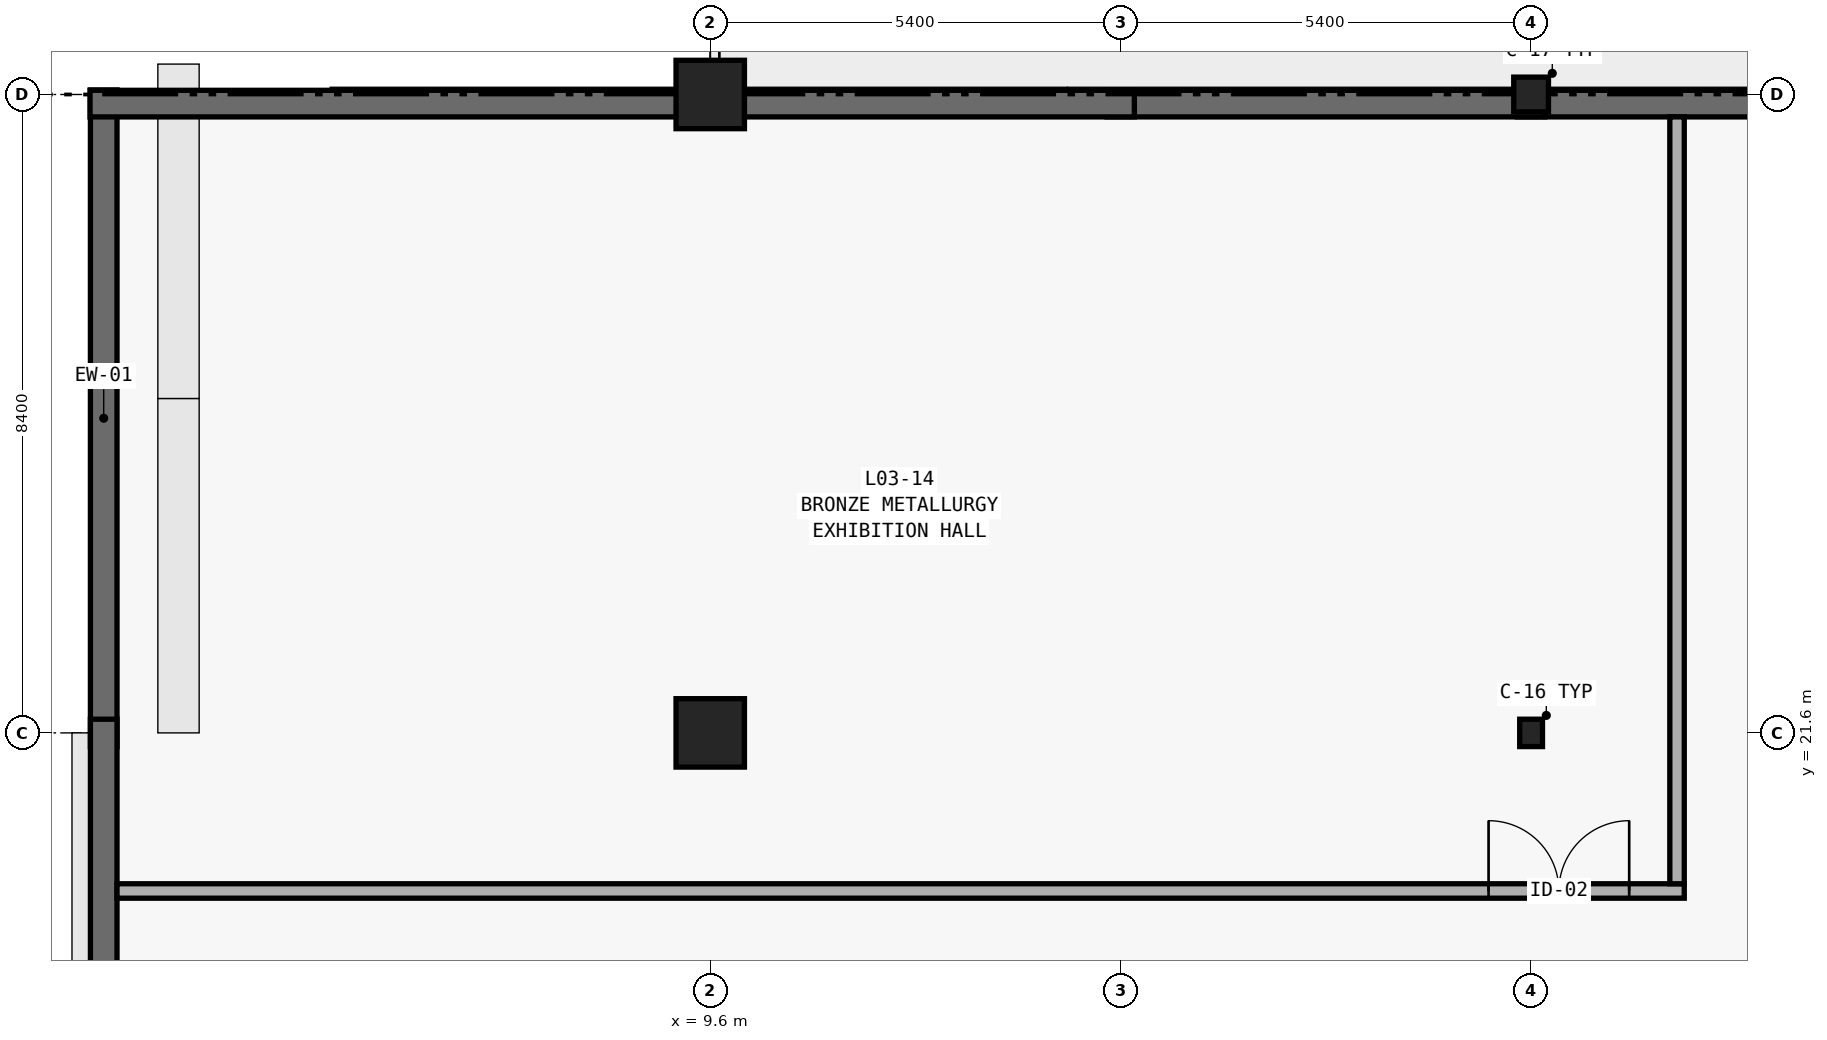
"""IFC4 building model, lengths in metres.
Left out: names, types, materials, properties, quantities, classifications, styles, units other than length and angle.
Written with IfcOpenShell. Run it as: python <this file> out.ifc"""

import sys

from ifc_helpers import new_model, si_unit, direction, frame, frame_2d, origin, origin_2d, place, context, subcontext, project, spatial, rectangle, hollow_circle, i_section, extrude, element, fill, save


model = new_model("IFC4")
c1 = context("Model", 3, precision=1e-05, world=origin(), true_north=direction((0.0, 1.0)))
c2 = subcontext(c1, "Body", "Model", "MODEL_VIEW")
j1 = project(units=[si_unit("LENGTHUNIT", "METRE"), si_unit("PLANEANGLEUNIT", "RADIAN")], contexts=[c1])
p1 = place(None, origin())
s1 = spatial("IfcSite", under=j1, at=p1, CompositionType="ELEMENT")
p2 = place(p1, origin())
s2 = spatial("IfcBuilding", under=s1, at=p2, CompositionType="ELEMENT")
p3 = place(p2, frame((0.0, 0.0, 17.1)))
s3 = spatial("IfcBuildingStorey", under=s2, at=p3, CompositionType="ELEMENT", Elevation=17.1)
for number, where, z_axis, x_axis in (
    (1, (9.6, 21.6, 0.0), (0.0, 0.0, 1.0), (1.0, 0.0, 0.0)),
    (2, (9.6, 30.0, 0.0), (0.0, 0.0, 1.0), (1.0, 0.0, 0.0)),
):
    element("IfcColumn", number, at=place(p3, frame(where, z_axis=z_axis, x_axis=x_axis)), inside=s3, PredefinedType="COLUMN", context=c2, shape_type="SweptSolid", body=[
        extrude(rectangle(XDim=0.9, YDim=0.9, at=origin_2d()), origin(), (0.0, 0.0, 1.0), 4.2),
    ])
p4 = place(p3, frame((20.4, 21.6, 0.0), z_axis=(0.0, 0.0, 1.0), x_axis=(1.0, 0.0, 0.0)))
e3 = element("IfcColumn", 3, at=p4, inside=s3, PredefinedType="COLUMN", context=c2, shape_type="SweptSolid", body=[
    extrude(i_section(OverallWidth=0.3, OverallDepth=0.36, WebThickness=0.012, FlangeThickness=0.022, FilletRadius=0.027, at=origin_2d()), origin(), (0.0, 0.0, 1.0), 4.2),
])
p5 = place(p3, frame((20.4, 30.0, 0.0), z_axis=(0.0, 0.0, 1.0), x_axis=(1.0, 0.0, 0.0)))
e4 = element("IfcColumn", 4, at=p5, inside=s3, PredefinedType="COLUMN", context=c2, shape_type="SweptSolid", body=[
    extrude(hollow_circle(Radius=0.229, WallThickness=0.02, at=origin_2d()), origin(), (0.0, 0.0, 1.0), 4.2),
])
p6 = place(p3, frame((1.62, 30.06, 0.0), z_axis=(0.0, 0.0, 1.0), x_axis=(0.0, -1.0, 0.0)))
e5 = element("IfcWall", 5, at=p6, inside=s3, PredefinedType="STANDARD", context=c2, shape_type="SweptSolid", body=[
    extrude(rectangle(XDim=8.64, YDim=0.35, at=frame_2d((4.32, 0.0))), origin(), (0.0, 0.0, 1.0), 3.9),
])
p7 = place(p3, frame((1.62, 21.78, 0.0), z_axis=(0.0, 0.0, 1.0), x_axis=(0.0, -1.0, 0.0)))
e6 = element("IfcWall", 6, at=p7, inside=s3, PredefinedType="STANDARD", context=c2, shape_type="SweptSolid", body=[
    extrude(rectangle(XDim=12.36, YDim=0.35, at=frame_2d((6.18, 0.0))), origin(), (0.0, 0.0, 1.0), 3.9),
])
p8 = place(p3, frame((30.18, 29.88, 0.0), z_axis=(0.0, 0.0, 1.0), x_axis=(-1.0, 0.0, 0.0)))
e7 = element("IfcWall", 7, at=p8, inside=s3, PredefinedType="STANDARD", context=c2, shape_type="SweptSolid", body=[
    extrude(rectangle(XDim=9.96, YDim=0.35, at=frame_2d((4.98, 0.0))), origin(), (0.0, 0.0, 1.0), 3.9),
])
for number, where, z_axis, x_axis in (
    (8, (20.58, 29.88, 0.0), (0.0, 0.0, 1.0), (-1.0, 0.0, 0.0)),
    (9, (15.18, 29.88, 0.0), (0.0, 0.0, 1.0), (-1.0, 0.0, 0.0)),
):
    element("IfcWall", number, at=place(p3, frame(where, z_axis=z_axis, x_axis=x_axis)), inside=s3, PredefinedType="STANDARD", context=c2, shape_type="SweptSolid", body=[
        extrude(rectangle(XDim=5.76, YDim=0.35, at=frame_2d((2.88, 0.0))), origin(), (0.0, 0.0, 1.0), 3.9),
    ])
p9 = place(p3, frame((9.78, 29.88, 0.0), z_axis=(0.0, 0.0, 1.0), x_axis=(-1.0, 0.0, 0.0)))
e10 = element("IfcWall", 10, at=p9, inside=s3, PredefinedType="STANDARD", context=c2, shape_type="SweptSolid", body=[
    extrude(rectangle(XDim=8.34, YDim=0.35, at=frame_2d((4.17, 0.0))), origin(), (0.0, 0.0, 1.0), 3.9),
])
p10 = place(p3, frame((1.795, 19.52, 0.0), z_axis=(0.0, 0.0, 1.0), x_axis=(1.0, 0.0, 0.0)))
e11 = element("IfcWall", 11, at=p10, inside=s3, PredefinedType="PARTITIONING", context=c2, shape_type="SweptSolid", body=[
    extrude(rectangle(XDim=20.62, YDim=0.19, at=frame_2d((10.31, 0.0))), origin(), (0.0, 0.0, 1.0), 2.82),
])
p11 = place(p10, frame((18.045, 0.0, 0.0)))
e12 = element("IfcOpeningElement", 12, at=p11, cuts=e11, PredefinedType="OPENING", context=c2, shape_type="SweptSolid", body=[
    extrude(rectangle(XDim=1.85, YDim=2.35, at=frame_2d((0.925, 1.175))), frame((0.0, 0.11, 0.0), z_axis=(0.0, -1.0, 0.0), x_axis=(1.0, 0.0, 0.0)), (0.0, 0.0, 1.0), 0.22),
])
p12 = place(p3, frame((22.32, 19.615, 0.0), z_axis=(0.0, 0.0, 1.0), x_axis=(0.0, 1.0, 0.0)))
e13 = element("IfcWall", 13, at=p12, inside=s3, PredefinedType="PARTITIONING", context=c2, shape_type="SweptSolid", body=[
    extrude(rectangle(XDim=10.09, YDim=0.19, at=frame_2d((5.045, 0.0))), origin(), (0.0, 0.0, 1.0), 2.82),
])
p13 = place(p11, origin())
e14 = element("IfcDoor", 14, at=p13, inside=s3, OperationType="DOUBLE_DOOR_SINGLE_SWING", PredefinedType="DOOR", context=c2, shape_type="SweptSolid", body=[
    extrude(rectangle(XDim=1.85, YDim=2.35, at=frame_2d((0.925, 1.175))), frame((0.0, 0.025, 0.0), z_axis=(0.0, -1.0, 0.0), x_axis=(1.0, 0.0, 0.0)), (0.0, 0.0, 1.0), 0.05),
])
fill(e12, e14)
save(model, sys.argv[1])
